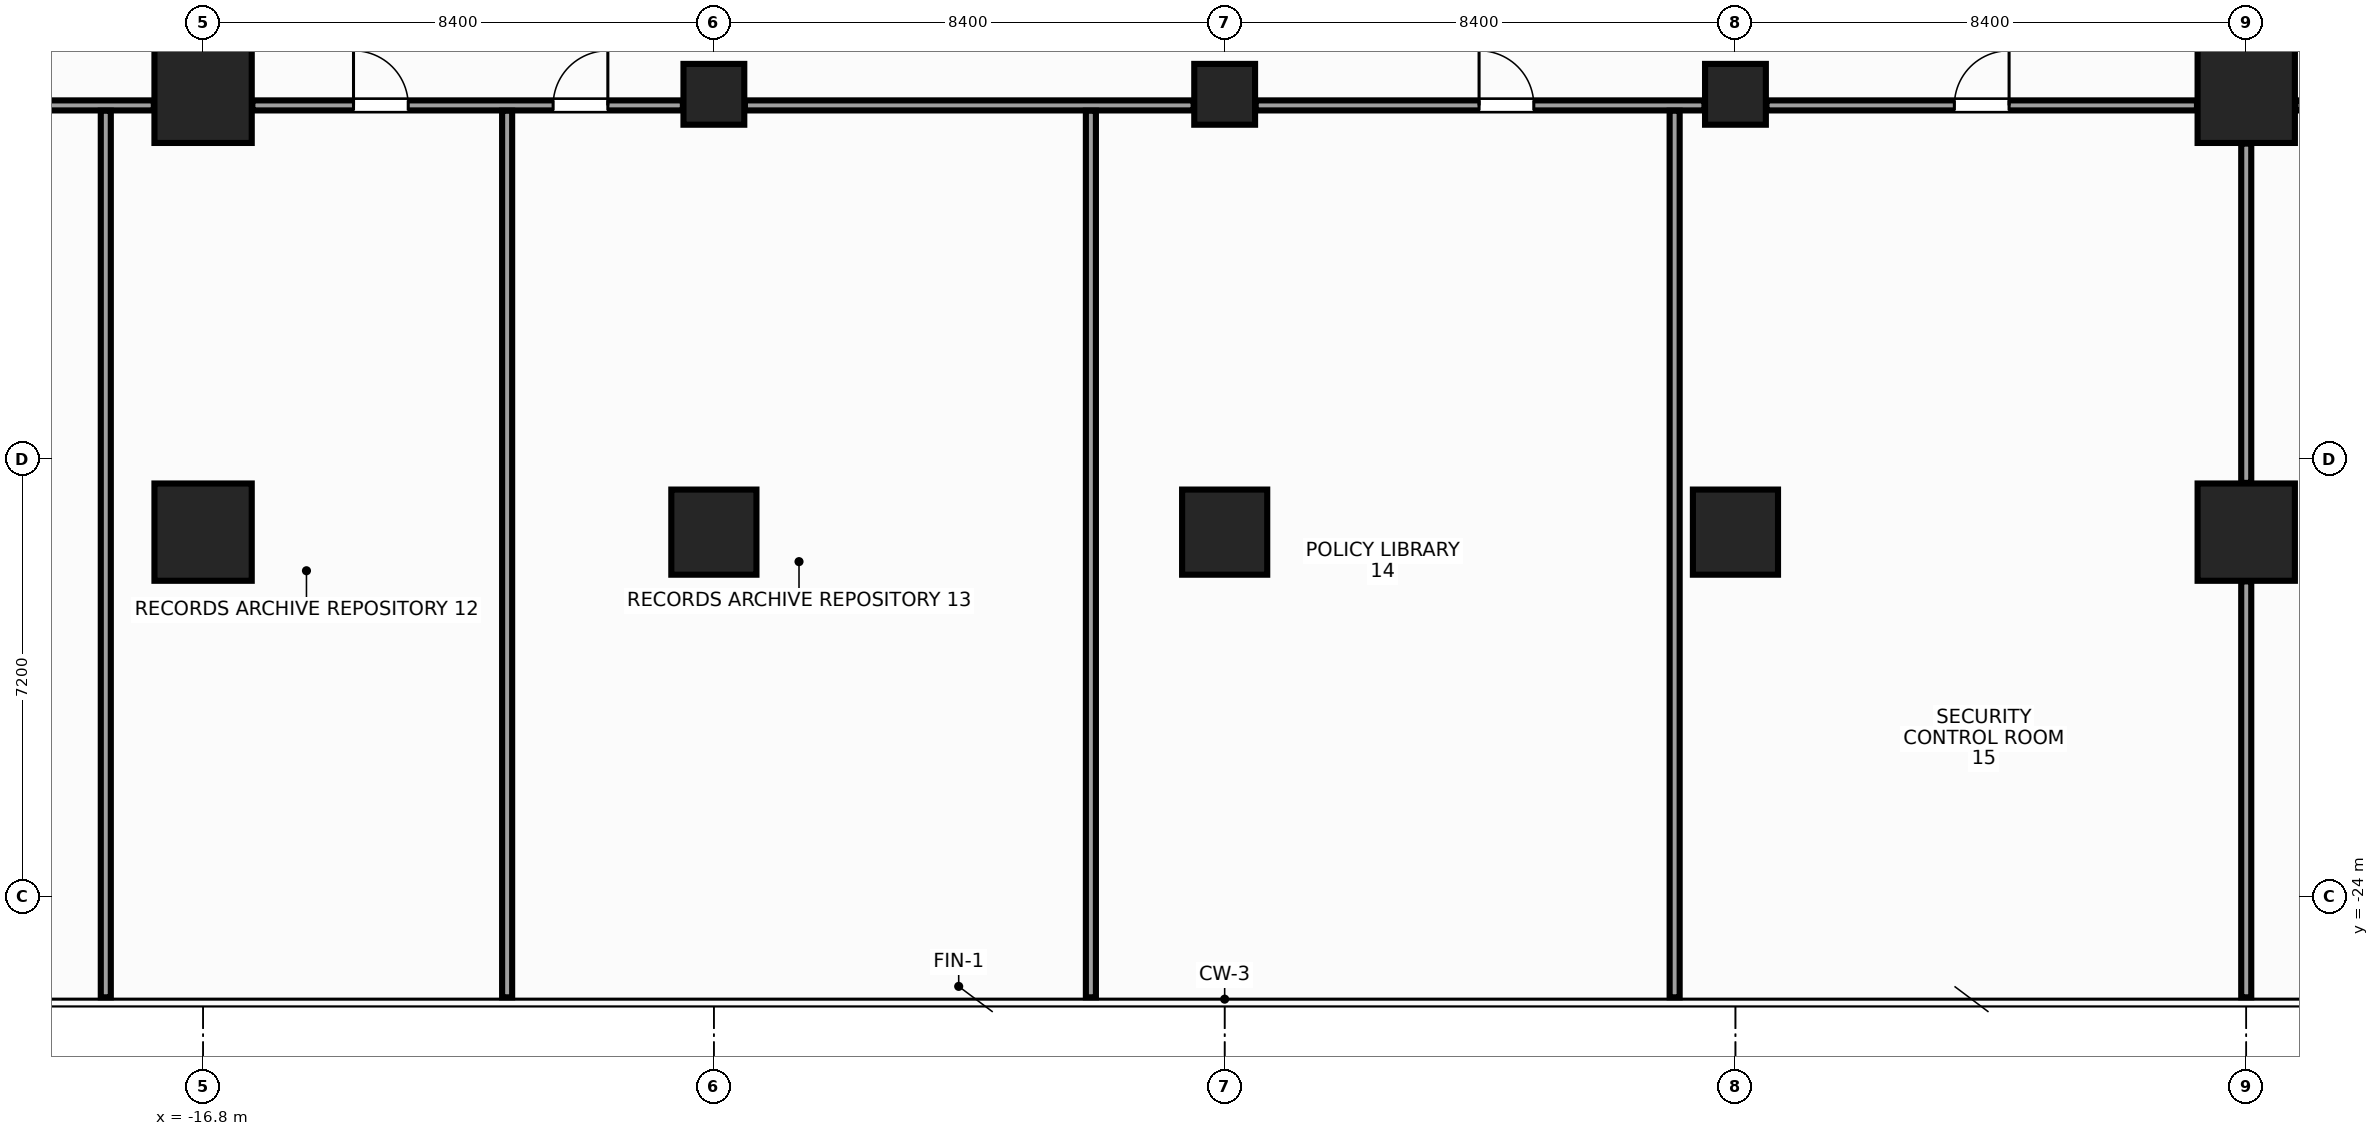
"""IFC4 building model, lengths in metres.
Left out: names, types, materials, properties, quantities, classifications, styles, units other than length and angle.
Written with IfcOpenShell. Run it as: python <this file> out.ifc"""

import sys

from ifc_helpers import new_model, si_unit, direction, frame, frame_2d, origin, origin_2d, place, context, subcontext, project, spatial, rectangle, hollow_rectangle, extrude, source, transform, mapped, element, fill, save


model = new_model("IFC4")
c1 = context("Model", 3, precision=1e-05, world=origin(), true_north=direction((0.0, 1.0)))
c2 = subcontext(c1, "Body", "Model", "MODEL_VIEW")
j1 = project(units=[si_unit("LENGTHUNIT", "METRE"), si_unit("PLANEANGLEUNIT", "RADIAN")], contexts=[c1])
p1 = place(None, origin())
s1 = spatial("IfcSite", under=j1, at=p1, CompositionType="ELEMENT")
p2 = place(p1, origin())
s2 = spatial("IfcBuilding", under=s1, at=p2, CompositionType="ELEMENT")
p3 = place(p2, frame((0.0, 0.0, 110.0)))
s3 = spatial("IfcBuildingStorey", under=s2, at=p3, CompositionType="ELEMENT", Elevation=110.0)
m1 = source(origin(), c2, "Body", "SweptSolid", [
    extrude(rectangle(XDim=1.6, YDim=1.6, at=origin_2d()), origin(), (0.0, 0.0, 1.0), 3.6),
])
for number, where, z_axis, x_axis in (
    (1, (-16.8, -18.0, 0.0), (0.0, 0.0, 1.0), (1.0, 0.0, 0.0)),
    (2, (-16.8, -10.8, 0.0), (0.0, 0.0, 1.0), (1.0, 0.0, 0.0)),
    (3, (16.8, -18.0, 0.0), (0.0, 0.0, 1.0), (1.0, 0.0, 0.0)),
    (4, (16.8, -10.8, 0.0), (0.0, 0.0, 1.0), (1.0, 0.0, 0.0)),
):
    element("IfcColumn", number, at=place(p3, frame(where, z_axis=z_axis, x_axis=x_axis)), inside=s3, PredefinedType="COLUMN", context=c2, shape_type="MappedRepresentation", body=[
        mapped(m1, transform((0.0, 0.0, 0.0), x_axis=(1.0, 0.0, 0.0), y_axis=(0.0, 1.0, 0.0), z_axis=(0.0, 0.0, 1.0), scale=1.0)),
    ])
m2 = source(origin(), c2, "Body", "SweptSolid", [
    extrude(rectangle(XDim=1.4, YDim=1.4, at=origin_2d()), origin(), (0.0, 0.0, 1.0), 3.6),
])
p4 = place(p3, frame((-8.4, -18.0, 0.0), z_axis=(0.0, 0.0, 1.0), x_axis=(1.0, 0.0, 0.0)))
e5 = element("IfcColumn", 5, at=p4, inside=s3, PredefinedType="COLUMN", context=c2, shape_type="MappedRepresentation", body=[
    mapped(m2, transform((0.0, 0.0, 0.0), x_axis=(1.0, 0.0, 0.0), y_axis=(0.0, 1.0, 0.0), z_axis=(0.0, 0.0, 1.0), scale=1.0)),
])
m3 = source(origin(), c2, "Body", "SweptSolid", [
    extrude(hollow_rectangle(XDim=1.0, YDim=1.0, WallThickness=0.045, at=origin_2d()), origin(), (0.0, 0.0, 1.0), 3.6),
])
p5 = place(p3, frame((-8.4, -10.8, 0.0), z_axis=(0.0, 0.0, 1.0), x_axis=(1.0, 0.0, 0.0)))
e6 = element("IfcColumn", 6, at=p5, inside=s3, PredefinedType="COLUMN", context=c2, shape_type="MappedRepresentation", body=[
    mapped(m3, transform((0.0, 0.0, 0.0), x_axis=(1.0, 0.0, 0.0), y_axis=(0.0, 1.0, 0.0), z_axis=(0.0, 0.0, 1.0), scale=1.0)),
])
p6 = place(p3, frame((8.4, -18.0, 0.0), z_axis=(0.0, 0.0, 1.0), x_axis=(1.0, 0.0, 0.0)))
e7 = element("IfcColumn", 7, at=p6, inside=s3, PredefinedType="COLUMN", context=c2, shape_type="MappedRepresentation", body=[
    mapped(m2, transform((0.0, 0.0, 0.0), x_axis=(1.0, 0.0, 0.0), y_axis=(0.0, 1.0, 0.0), z_axis=(0.0, 0.0, 1.0), scale=1.0)),
])
p7 = place(p3, frame((8.4, -10.8, 0.0), z_axis=(0.0, 0.0, 1.0), x_axis=(1.0, 0.0, 0.0)))
e8 = element("IfcColumn", 8, at=p7, inside=s3, PredefinedType="COLUMN", context=c2, shape_type="MappedRepresentation", body=[
    mapped(m3, transform((0.0, 0.0, 0.0), x_axis=(1.0, 0.0, 0.0), y_axis=(0.0, 1.0, 0.0), z_axis=(0.0, 0.0, 1.0), scale=1.0)),
])
p8 = place(p3, frame((0.0, -18.0, 0.0), z_axis=(0.0, 0.0, 1.0), x_axis=(1.0, 0.0, 0.0)))
e9 = element("IfcColumn", 9, at=p8, inside=s3, PredefinedType="COLUMN", context=c2, shape_type="MappedRepresentation", body=[
    mapped(m2, transform((0.0, 0.0, 0.0), x_axis=(1.0, 0.0, 0.0), y_axis=(0.0, 1.0, 0.0), z_axis=(0.0, 0.0, 1.0), scale=1.0)),
])
m4 = source(origin(), c2, "Body", "SweptSolid", [
    extrude(rectangle(XDim=1.0, YDim=1.0, at=origin_2d()), origin(), (0.0, 0.0, 1.0), 3.6),
])
p9 = place(p3, frame((0.0, -10.8, 0.0), z_axis=(0.0, 0.0, 1.0), x_axis=(1.0, 0.0, 0.0)))
e10 = element("IfcColumn", 10, at=p9, inside=s3, PredefinedType="COLUMN", context=c2, shape_type="MappedRepresentation", body=[
    mapped(m4, transform((0.0, 0.0, 0.0), x_axis=(1.0, 0.0, 0.0), y_axis=(0.0, 1.0, 0.0), z_axis=(0.0, 0.0, 1.0), scale=1.0)),
])
m5 = source(origin(), c2, "Body", "SweptSolid", [
    extrude(rectangle(XDim=3.155, YDim=0.165, at=frame_2d((1.577, 0.0))), origin(), (0.0, 0.0, 1.0), 2.745),
])
p10 = place(p3, frame((-20.765, -10.982, 0.0), z_axis=(0.0, 0.0, 1.0), x_axis=(1.0, 0.0, 0.0)))
e11 = element("IfcWall", 11, at=p10, inside=s3, PredefinedType="PARTITIONING", context=c2, shape_type="MappedRepresentation", body=[
    mapped(m5, transform((0.0, 0.0, 0.0), x_axis=(1.0, 0.0, 0.0), y_axis=(0.0, 1.0, 0.0), z_axis=(0.0, 0.0, 1.0), scale=1.0)),
])
m6 = source(origin(), c2, "Body", "SweptSolid", [
    extrude(rectangle(XDim=7.08, YDim=0.165, at=frame_2d((3.54, 0.0))), origin(), (0.0, 0.0, 1.0), 2.745),
])
p11 = place(p3, frame((-15.99, -10.982, 0.0), z_axis=(0.0, 0.0, 1.0), x_axis=(1.0, 0.0, 0.0)))
e12 = element("IfcWall", 12, at=p11, inside=s3, PredefinedType="PARTITIONING", context=c2, shape_type="MappedRepresentation", body=[
    mapped(m6, transform((0.0, 0.0, 0.0), x_axis=(1.0, 0.0, 0.0), y_axis=(0.0, 1.0, 0.0), z_axis=(0.0, 0.0, 1.0), scale=1.0)),
])
p12 = place(p11, frame((1.664, 0.0, 0.0)))
e13 = element("IfcOpeningElement", 13, at=p12, cuts=e12, PredefinedType="OPENING", context=c2, shape_type="SweptSolid", body=[
    extrude(rectangle(XDim=0.9, YDim=2.15, at=frame_2d((0.45, 1.075))), frame((0.0, 0.094, 0.0), z_axis=(0.0, -1.0, 0.0), x_axis=(1.0, 0.0, 0.0)), (0.0, 0.0, 1.0), 0.189),
])
p13 = place(p11, frame((4.946, 0.0, 0.0)))
e14 = element("IfcOpeningElement", 14, at=p13, cuts=e12, PredefinedType="OPENING", context=c2, shape_type="SweptSolid", body=[
    extrude(rectangle(XDim=0.9, YDim=2.15, at=frame_2d((0.45, 1.075))), frame((0.0, 0.094, 0.0), z_axis=(0.0, -1.0, 0.0), x_axis=(1.0, 0.0, 0.0)), (0.0, 0.0, 1.0), 0.189),
])
m7 = source(origin(), c2, "Body", "SweptSolid", [
    extrude(rectangle(XDim=7.38, YDim=0.165, at=frame_2d((3.69, 0.0))), origin(), (0.0, 0.0, 1.0), 2.745),
])
p14 = place(p3, frame((-7.89, -10.982, 0.0), z_axis=(0.0, 0.0, 1.0), x_axis=(1.0, 0.0, 0.0)))
e15 = element("IfcWall", 15, at=p14, inside=s3, PredefinedType="PARTITIONING", context=c2, shape_type="MappedRepresentation", body=[
    mapped(m7, transform((0.0, 0.0, 0.0), x_axis=(1.0, 0.0, 0.0), y_axis=(0.0, 1.0, 0.0), z_axis=(0.0, 0.0, 1.0), scale=1.0)),
])
p15 = place(p3, frame((0.51, -10.982, 0.0), z_axis=(0.0, 0.0, 1.0), x_axis=(1.0, 0.0, 0.0)))
e16 = element("IfcWall", 16, at=p15, inside=s3, PredefinedType="PARTITIONING", context=c2, shape_type="MappedRepresentation", body=[
    mapped(m7, transform((0.0, 0.0, 0.0), x_axis=(1.0, 0.0, 0.0), y_axis=(0.0, 1.0, 0.0), z_axis=(0.0, 0.0, 1.0), scale=1.0)),
])
p16 = place(p15, frame((3.674, 0.0, 0.0)))
e17 = element("IfcOpeningElement", 17, at=p16, cuts=e16, PredefinedType="OPENING", context=c2, shape_type="SweptSolid", body=[
    extrude(rectangle(XDim=0.9, YDim=2.15, at=frame_2d((0.45, 1.075))), frame((0.0, 0.094, 0.0), z_axis=(0.0, -1.0, 0.0), x_axis=(1.0, 0.0, 0.0)), (0.0, 0.0, 1.0), 0.189),
])
p17 = place(p3, frame((8.91, -10.982, 0.0), z_axis=(0.0, 0.0, 1.0), x_axis=(1.0, 0.0, 0.0)))
e18 = element("IfcWall", 18, at=p17, inside=s3, PredefinedType="PARTITIONING", context=c2, shape_type="MappedRepresentation", body=[
    mapped(m6, transform((0.0, 0.0, 0.0), x_axis=(1.0, 0.0, 0.0), y_axis=(0.0, 1.0, 0.0), z_axis=(0.0, 0.0, 1.0), scale=1.0)),
])
p18 = place(p17, frame((3.09, 0.0, 0.0)))
e19 = element("IfcOpeningElement", 19, at=p18, cuts=e18, PredefinedType="OPENING", context=c2, shape_type="SweptSolid", body=[
    extrude(rectangle(XDim=0.9, YDim=2.15, at=frame_2d((0.45, 1.075))), frame((0.0, 0.094, 0.0), z_axis=(0.0, -1.0, 0.0), x_axis=(1.0, 0.0, 0.0)), (0.0, 0.0, 1.0), 0.189),
])
p19 = place(p3, frame((17.61, -10.982, 0.0), z_axis=(0.0, 0.0, 1.0), x_axis=(1.0, 0.0, 0.0)))
e20 = element("IfcWall", 20, at=p19, inside=s3, PredefinedType="PARTITIONING", context=c2, shape_type="MappedRepresentation", body=[
    mapped(m5, transform((0.0, 0.0, 0.0), x_axis=(1.0, 0.0, 0.0), y_axis=(0.0, 1.0, 0.0), z_axis=(0.0, 0.0, 1.0), scale=1.0)),
])
m8 = source(origin(), c2, "Body", "SweptSolid", [
    extrude(rectangle(XDim=14.58, YDim=0.165, at=frame_2d((7.29, 0.0))), origin(), (0.0, 0.0, 1.0), 2.745),
])
for number, where, z_axis, x_axis in (
    (21, (-18.4, -25.65, 0.0), (0.0, 0.0, 1.0), (0.0, 1.0, 0.0)),
    (22, (-11.8, -25.65, 0.0), (0.0, 0.0, 1.0), (0.0, 1.0, 0.0)),
    (23, (-2.2, -25.65, 0.0), (0.0, 0.0, 1.0), (0.0, 1.0, 0.0)),
    (24, (7.4, -25.65, 0.0), (0.0, 0.0, 1.0), (0.0, 1.0, 0.0)),
):
    element("IfcWall", number, at=place(p3, frame(where, z_axis=z_axis, x_axis=x_axis)), inside=s3, PredefinedType="PARTITIONING", context=c2, shape_type="MappedRepresentation", body=[
        mapped(m8, transform((0.0, 0.0, 0.0), x_axis=(1.0, 0.0, 0.0), y_axis=(0.0, 1.0, 0.0), z_axis=(0.0, 0.0, 1.0), scale=1.0)),
    ])
m9 = source(origin(), c2, "Body", "SweptSolid", [
    extrude(rectangle(XDim=6.84, YDim=0.165, at=frame_2d((3.42, 0.0))), origin(), (0.0, 0.0, 1.0), 3.36),
])
p20 = place(p3, frame((16.8, -25.65, 0.0), z_axis=(0.0, 0.0, 1.0), x_axis=(0.0, 1.0, 0.0)))
e25 = element("IfcWall", 25, at=p20, inside=s3, PredefinedType="PARTITIONING", context=c2, shape_type="MappedRepresentation", body=[
    mapped(m9, transform((0.0, 0.0, 0.0), x_axis=(1.0, 0.0, 0.0), y_axis=(0.0, 1.0, 0.0), z_axis=(0.0, 0.0, 1.0), scale=1.0)),
])
m10 = source(origin(), c2, "Body", "SweptSolid", [
    extrude(rectangle(XDim=5.58, YDim=0.165, at=frame_2d((2.79, 0.0))), origin(), (0.0, 0.0, 1.0), 2.945),
])
p21 = place(p3, frame((16.8, -17.19, 0.0), z_axis=(0.0, 0.0, 1.0), x_axis=(0.0, 1.0, 0.0)))
e26 = element("IfcWall", 26, at=p21, inside=s3, PredefinedType="PARTITIONING", context=c2, shape_type="MappedRepresentation", body=[
    mapped(m10, transform((0.0, 0.0, 0.0), x_axis=(1.0, 0.0, 0.0), y_axis=(0.0, 1.0, 0.0), z_axis=(0.0, 0.0, 1.0), scale=1.0)),
])
m11 = source(origin(), c2, "Body", "SweptSolid", [
    extrude(rectangle(XDim=0.9, YDim=2.15, at=frame_2d((0.45, 1.075))), frame((0.0, 0.025, 0.0), z_axis=(0.0, -1.0, 0.0), x_axis=(1.0, 0.0, 0.0)), (0.0, 0.0, 1.0), 0.05),
])
p22 = place(p12, origin())
e27 = element("IfcDoor", 27, at=p22, inside=s3, OperationType="SINGLE_SWING_LEFT", PredefinedType="DOOR", context=c2, shape_type="MappedRepresentation", body=[
    mapped(m11, transform((0.0, 0.0, 0.0), x_axis=(1.0, 0.0, 0.0), y_axis=(0.0, 1.0, 0.0), z_axis=(0.0, 0.0, 1.0), scale=1.0)),
])
fill(e13, e27)
p23 = place(p13, origin())
e28 = element("IfcDoor", 28, at=p23, inside=s3, OperationType="SINGLE_SWING_RIGHT", PredefinedType="DOOR", context=c2, shape_type="MappedRepresentation", body=[
    mapped(m11, transform((0.0, 0.0, 0.0), x_axis=(1.0, 0.0, 0.0), y_axis=(0.0, 1.0, 0.0), z_axis=(0.0, 0.0, 1.0), scale=1.0)),
])
fill(e14, e28)
p24 = place(p16, origin())
e29 = element("IfcDoor", 29, at=p24, inside=s3, OperationType="SINGLE_SWING_LEFT", PredefinedType="DOOR", context=c2, shape_type="MappedRepresentation", body=[
    mapped(m11, transform((0.0, 0.0, 0.0), x_axis=(1.0, 0.0, 0.0), y_axis=(0.0, 1.0, 0.0), z_axis=(0.0, 0.0, 1.0), scale=1.0)),
])
fill(e17, e29)
p25 = place(p18, origin())
e30 = element("IfcDoor", 30, at=p25, inside=s3, OperationType="SINGLE_SWING_RIGHT", PredefinedType="DOOR", context=c2, shape_type="MappedRepresentation", body=[
    mapped(m11, transform((0.0, 0.0, 0.0), x_axis=(1.0, 0.0, 0.0), y_axis=(0.0, 1.0, 0.0), z_axis=(0.0, 0.0, 1.0), scale=1.0)),
])
fill(e19, e30)
save(model, sys.argv[1])
